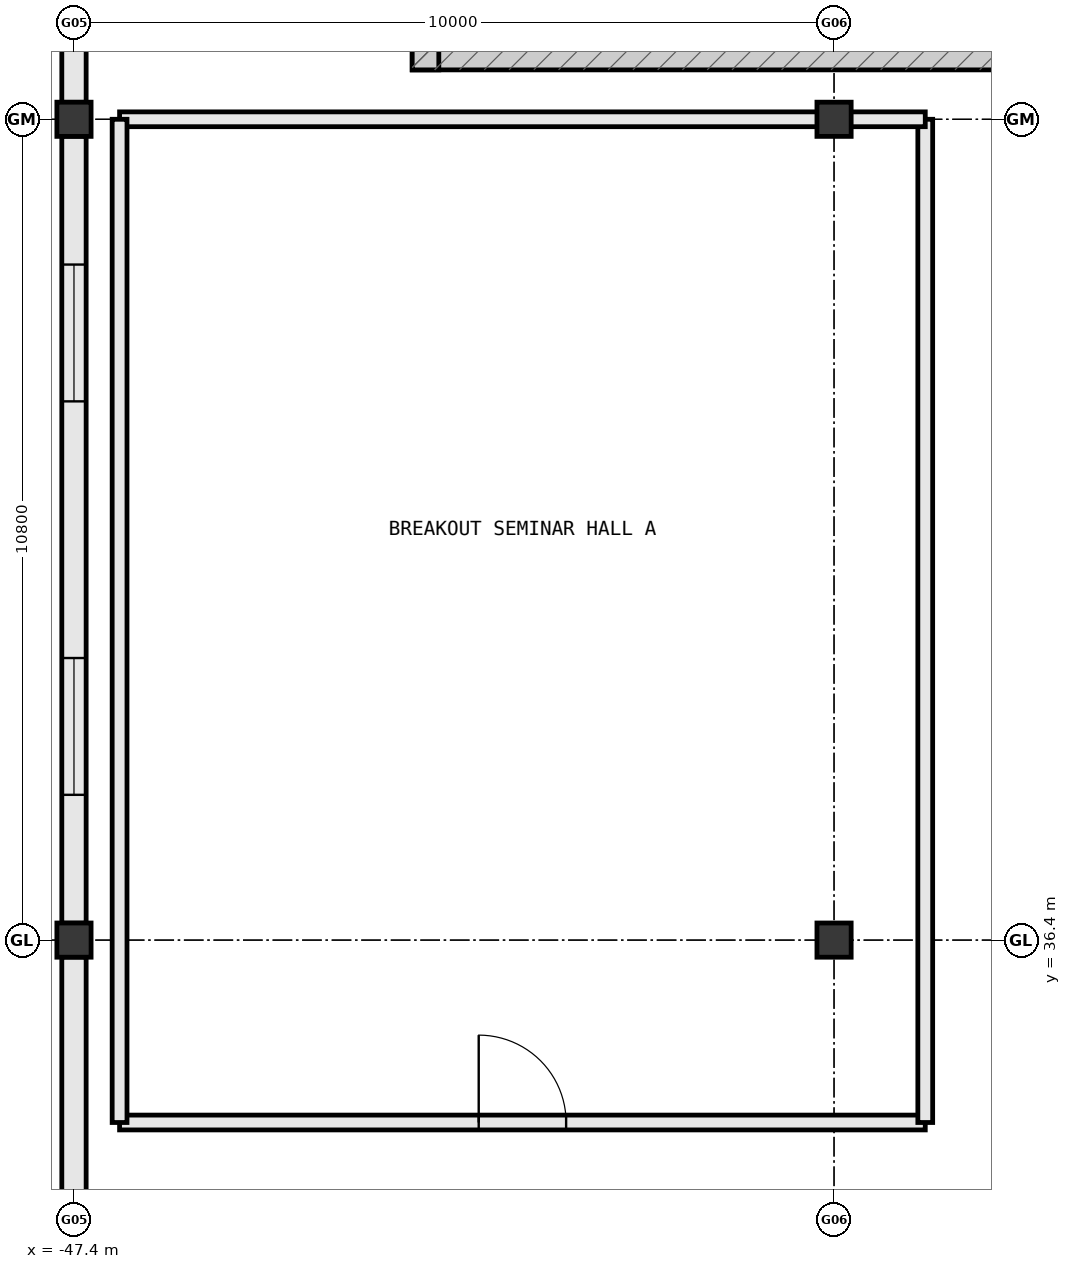
"""IFC4 building model, lengths in metres.
Left out: names, types, materials, properties, quantities, classifications, styles, units other than length and angle.
Written with IfcOpenShell. Run it as: python <this file> out.ifc"""

import sys

from ifc_helpers import new_model, si_unit, direction, frame, frame_2d, origin, origin_2d, place, context, subcontext, project, spatial, rectangle, extrude, element, fill, save


model = new_model("IFC4")
c1 = context("Model", 3, precision=1e-05, world=origin(), true_north=direction((0.0, 1.0)))
c2 = subcontext(c1, "Body", "Model", "MODEL_VIEW")
j1 = project(units=[si_unit("LENGTHUNIT", "METRE"), si_unit("PLANEANGLEUNIT", "RADIAN")], contexts=[c1])
p1 = place(None, origin())
s1 = spatial("IfcSite", under=j1, at=p1, CompositionType="ELEMENT")
p2 = place(p1, origin())
s2 = spatial("IfcBuilding", under=s1, at=p2, CompositionType="ELEMENT")
p3 = place(p2, frame((0.0, 0.0, 5.4)))
s3 = spatial("IfcBuildingStorey", under=s2, at=p3, CompositionType="ELEMENT", Elevation=5.4)
for number, where, z_axis, x_axis in (
    (1, (-47.4, 36.4, 0.0), (0.0, 0.0, 1.0), (1.0, 0.0, 0.0)),
    (2, (-47.4, 47.2, 0.0), (0.0, 0.0, 1.0), (1.0, 0.0, 0.0)),
    (3, (-37.4, 36.4, 0.0), (0.0, 0.0, 1.0), (1.0, 0.0, 0.0)),
    (4, (-37.4, 47.2, 0.0), (0.0, 0.0, 1.0), (1.0, 0.0, 0.0)),
):
    element("IfcColumn", number, at=place(p3, frame(where, z_axis=z_axis, x_axis=x_axis)), inside=s3, PredefinedType="COLUMN", context=c2, shape_type="SweptSolid", body=[
        extrude(rectangle(XDim=0.45, YDim=0.45, at=origin_2d()), origin(), (0.0, 0.0, 1.0), 5.4),
    ])
p4 = place(p3, frame((-47.4, 57.777, 0.0), z_axis=(0.0, 0.0, 1.0), x_axis=(0.0, -1.0, 0.0)))
e5 = element("IfcWall", 5, at=p4, inside=s3, PredefinedType="STANDARD", context=c2, shape_type="SweptSolid", body=[
    extrude(rectangle(XDim=10.354, YDim=0.32, at=frame_2d((5.177, 0.0))), origin(), (0.0, 0.0, 1.0), 4.432),
])
p5 = place(p4, frame((1.688, 0.0, 0.85)))
e6 = element("IfcOpeningElement", 6, at=p5, cuts=e5, PredefinedType="OPENING", context=c2, shape_type="SweptSolid", body=[
    extrude(rectangle(XDim=1.8, YDim=1.85, at=frame_2d((0.9, 0.925))), frame((0.0, 0.172, 0.0), z_axis=(0.0, -1.0, 0.0), x_axis=(1.0, 0.0, 0.0)), (0.0, 0.0, 1.0), 0.344),
])
p6 = place(p4, frame((6.865, 0.0, 0.85)))
e7 = element("IfcOpeningElement", 7, at=p6, cuts=e5, PredefinedType="OPENING", context=c2, shape_type="SweptSolid", body=[
    extrude(rectangle(XDim=1.8, YDim=1.85, at=frame_2d((0.9, 0.925))), frame((0.0, 0.172, 0.0), z_axis=(0.0, -1.0, 0.0), x_axis=(1.0, 0.0, 0.0)), (0.0, 0.0, 1.0), 0.344),
])
p7 = place(p3, frame((-47.4, 46.977, 0.0), z_axis=(0.0, 0.0, 1.0), x_axis=(0.0, -1.0, 0.0)))
e8 = element("IfcWall", 8, at=p7, inside=s3, PredefinedType="STANDARD", context=c2, shape_type="SweptSolid", body=[
    extrude(rectangle(XDim=10.354, YDim=0.32, at=frame_2d((5.177, 0.0))), origin(), (0.0, 0.0, 1.0), 4.432),
])
p8 = place(p7, frame((1.688, 0.0, 0.85)))
e9 = element("IfcOpeningElement", 9, at=p8, cuts=e8, PredefinedType="OPENING", context=c2, shape_type="SweptSolid", body=[
    extrude(rectangle(XDim=1.8, YDim=1.85, at=frame_2d((0.9, 0.925))), frame((0.0, 0.172, 0.0), z_axis=(0.0, -1.0, 0.0), x_axis=(1.0, 0.0, 0.0)), (0.0, 0.0, 1.0), 0.344),
])
p9 = place(p7, frame((6.865, 0.0, 0.85)))
e10 = element("IfcOpeningElement", 10, at=p9, cuts=e8, PredefinedType="OPENING", context=c2, shape_type="SweptSolid", body=[
    extrude(rectangle(XDim=1.8, YDim=1.85, at=frame_2d((0.9, 0.925))), frame((0.0, 0.172, 0.0), z_axis=(0.0, -1.0, 0.0), x_axis=(1.0, 0.0, 0.0)), (0.0, 0.0, 1.0), 0.344),
])
p10 = place(p3, frame((-47.4, 36.177, 0.0), z_axis=(0.0, 0.0, 1.0), x_axis=(0.0, -1.0, 0.0)))
e11 = element("IfcWall", 11, at=p10, inside=s3, PredefinedType="STANDARD", context=c2, shape_type="SweptSolid", body=[
    extrude(rectangle(XDim=8.989, YDim=0.32, at=frame_2d((4.494, 0.0))), origin(), (0.0, 0.0, 1.0), 4.508),
])
p11 = place(p10, frame((3.594, 0.0, 0.85)))
e12 = element("IfcOpeningElement", 12, at=p11, cuts=e11, PredefinedType="OPENING", context=c2, shape_type="SweptSolid", body=[
    extrude(rectangle(XDim=1.8, YDim=1.85, at=frame_2d((0.9, 0.925))), frame((0.0, 0.172, 0.0), z_axis=(0.0, -1.0, 0.0), x_axis=(1.0, 0.0, 0.0)), (0.0, 0.0, 1.0), 0.344),
])
p12 = place(p3, frame((-42.95, 48.025, 0.0), z_axis=(0.0, 0.0, 1.0), x_axis=(1.0, 0.0, 0.0)))
e13 = element("IfcWall", 13, at=p12, inside=s3, PredefinedType="SHEAR", context=c2, shape_type="SweptSolid", body=[
    extrude(rectangle(XDim=12.1, YDim=0.35, at=frame_2d((6.05, 0.0))), origin(), (0.0, 0.0, 1.0), 5.4),
])
p13 = place(p3, frame((-42.775, 53.55, 0.0), z_axis=(0.0, 0.0, 1.0), x_axis=(0.0, -1.0, 0.0)))
e14 = element("IfcWall", 14, at=p13, inside=s3, PredefinedType="SHEAR", context=c2, shape_type="SweptSolid", body=[
    extrude(rectangle(XDim=5.7, YDim=0.35, at=frame_2d((2.85, 0.0))), origin(), (0.0, 0.0, 1.0), 5.4),
])
p14 = place(p13, frame((2.25, 0.0, 0.0)))
e15 = element("IfcOpeningElement", 15, at=p14, cuts=e14, PredefinedType="OPENING", context=c2, shape_type="SweptSolid", body=[
    extrude(rectangle(XDim=1.2, YDim=2.2, at=frame_2d((0.6, 1.1))), frame((0.0, 0.187, 0.0), z_axis=(0.0, -1.0, 0.0), x_axis=(1.0, 0.0, 0.0)), (0.0, 0.0, 1.0), 0.374),
])
p15 = place(p3, frame((-46.8, 34.0, 0.0), z_axis=(0.0, 0.0, 1.0), x_axis=(1.0, 0.0, 0.0)))
e16 = element("IfcWall", 16, at=p15, inside=s3, PredefinedType="PARTITIONING", context=c2, shape_type="SweptSolid", body=[
    extrude(rectangle(XDim=10.6, YDim=0.195, at=frame_2d((5.3, 0.0))), origin(), (0.0, 0.0, 1.0), 5.13),
])
p16 = place(p15, frame((4.725, 0.0, 0.0)))
e17 = element("IfcOpeningElement", 17, at=p16, cuts=e16, PredefinedType="OPENING", context=c2, shape_type="SweptSolid", body=[
    extrude(rectangle(XDim=1.15, YDim=2.2, at=frame_2d((0.575, 1.1))), frame((0.0, 0.11, 0.0), z_axis=(0.0, -1.0, 0.0), x_axis=(1.0, 0.0, 0.0)), (0.0, 0.0, 1.0), 0.219),
])
p17 = place(p3, frame((-36.2, 34.0, 0.0), z_axis=(0.0, 0.0, 1.0), x_axis=(0.0, 1.0, 0.0)))
e18 = element("IfcWall", 18, at=p17, inside=s3, PredefinedType="PARTITIONING", context=c2, shape_type="SweptSolid", body=[
    extrude(rectangle(XDim=13.2, YDim=0.195, at=frame_2d((6.6, 0.0))), origin(), (0.0, 0.0, 1.0), 5.13),
])
p18 = place(p3, frame((-36.2, 47.2, 0.0), z_axis=(0.0, 0.0, 1.0), x_axis=(-1.0, 0.0, 0.0)))
e19 = element("IfcWall", 19, at=p18, inside=s3, PredefinedType="PARTITIONING", context=c2, shape_type="SweptSolid", body=[
    extrude(rectangle(XDim=10.6, YDim=0.195, at=frame_2d((5.3, 0.0))), origin(), (0.0, 0.0, 1.0), 4.424),
])
p19 = place(p3, frame((-46.8, 47.2, 0.0), z_axis=(0.0, 0.0, 1.0), x_axis=(0.0, -1.0, 0.0)))
e20 = element("IfcWall", 20, at=p19, inside=s3, PredefinedType="PARTITIONING", context=c2, shape_type="SweptSolid", body=[
    extrude(rectangle(XDim=13.2, YDim=0.195, at=frame_2d((6.6, 0.0))), origin(), (0.0, 0.0, 1.0), 5.13),
])
p20 = place(p8, origin())
e21 = element("IfcWindow", 21, at=p20, inside=s3, PartitioningType="SINGLE_PANEL", PredefinedType="WINDOW", context=c2, shape_type="SweptSolid", body=[
    extrude(rectangle(XDim=1.8, YDim=1.85, at=frame_2d((0.9, 0.925))), frame((0.0, 0.03, 0.0), z_axis=(0.0, -1.0, 0.0), x_axis=(1.0, 0.0, 0.0)), (0.0, 0.0, 1.0), 0.06),
])
fill(e9, e21)
p21 = place(p9, origin())
e22 = element("IfcWindow", 22, at=p21, inside=s3, PartitioningType="SINGLE_PANEL", PredefinedType="WINDOW", context=c2, shape_type="SweptSolid", body=[
    extrude(rectangle(XDim=1.8, YDim=1.85, at=frame_2d((0.9, 0.925))), frame((0.0, 0.03, 0.0), z_axis=(0.0, -1.0, 0.0), x_axis=(1.0, 0.0, 0.0)), (0.0, 0.0, 1.0), 0.06),
])
fill(e10, e22)
p22 = place(p16, origin())
e23 = element("IfcDoor", 23, at=p22, inside=s3, OperationType="SINGLE_SWING_LEFT", PredefinedType="DOOR", context=c2, shape_type="SweptSolid", body=[
    extrude(rectangle(XDim=1.15, YDim=2.2, at=frame_2d((0.575, 1.1))), frame((0.0, 0.025, 0.0), z_axis=(0.0, -1.0, 0.0), x_axis=(1.0, 0.0, 0.0)), (0.0, 0.0, 1.0), 0.05),
])
fill(e17, e23)
save(model, sys.argv[1])
